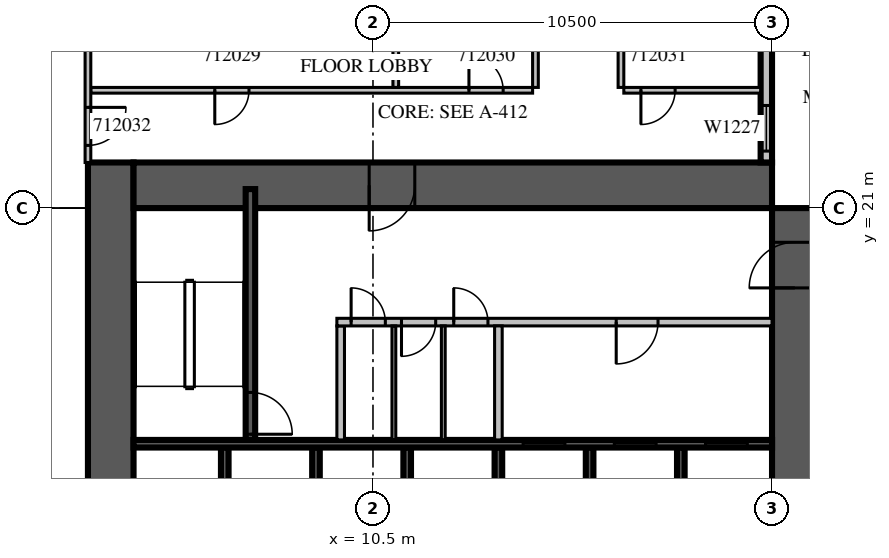
"""IFC4 building model, lengths in metres.
Left out: names, types, materials, properties, quantities, classifications, styles, units other than length and angle.
Written with IfcOpenShell. Run it as: python <this file> out.ifc"""

import sys

from ifc_helpers import new_model, si_unit, direction, frame, frame_2d, origin, place, context, subcontext, project, spatial, rectangle, extrude, source, transform, mapped, element, fill, save


model = new_model("IFC4")
c1 = context("Model", 3, precision=1e-05, world=origin(), true_north=direction((0.0, 1.0)))
c2 = subcontext(c1, "Body", "Model", "MODEL_VIEW")
j1 = project(units=[si_unit("LENGTHUNIT", "METRE"), si_unit("PLANEANGLEUNIT", "RADIAN")], contexts=[c1])
p1 = place(None, origin())
s1 = spatial("IfcSite", under=j1, at=p1, CompositionType="ELEMENT")
p2 = place(p1, origin())
s2 = spatial("IfcBuilding", under=s1, at=p2, CompositionType="ELEMENT")
p3 = place(p2, frame((0.0, 0.0, 61.5)))
s3 = spatial("IfcBuildingStorey", under=s2, at=p3, CompositionType="ELEMENT", Elevation=61.5)
m1 = source(origin(), c2, "Body", "SweptSolid", [
    extrude(rectangle(XDim=18.0, YDim=1.2, at=frame_2d((9.0, 0.0))), origin(), (0.0, 0.0, 1.0), 4.2),
])
p4 = place(p3, frame((3.6, 4.2, 0.0), z_axis=(0.0, 0.0, 1.0), x_axis=(0.0, 1.0, 0.0)))
e1 = element("IfcWall", 1, at=p4, inside=s3, PredefinedType="SHEAR", context=c2, shape_type="MappedRepresentation", body=[
    mapped(m1, transform((0.0, 0.0, 0.0), scale=1.0)),
])
m2 = source(origin(), c2, "Body", "SweptSolid", [
    extrude(rectangle(XDim=2.2, YDim=2.1, at=frame_2d((1.1, 1.05))), frame((0.0, 0.61, 0.0), z_axis=(0.0, -1.0, 0.0), x_axis=(1.0, 0.0, 0.0)), (0.0, 0.0, 1.0), 1.22),
])
p5 = place(p4, frame((4.2, 0.0, 0.0)))
e2 = element("IfcOpeningElement", 2, at=p5, cuts=e1, PredefinedType="OPENING", context=c2, shape_type="MappedRepresentation", body=[
    mapped(m2, transform((0.0, 0.0, 0.0), scale=1.0)),
])
m3 = source(origin(), c2, "Body", "SweptSolid", [
    extrude(rectangle(XDim=16.8, YDim=1.2, at=frame_2d((8.4, 0.0))), origin(), (0.0, 0.0, 1.0), 4.2),
])
p6 = place(p3, frame((21.6, 4.2, 0.0), z_axis=(0.0, 0.0, 1.0), x_axis=(0.0, 1.0, 0.0)))
e3 = element("IfcWall", 3, at=p6, inside=s3, PredefinedType="SHEAR", context=c2, shape_type="MappedRepresentation", body=[
    mapped(m3, transform((0.0, 0.0, 0.0), scale=1.0)),
])
p7 = place(p6, frame((4.2, 0.0, 0.0)))
e4 = element("IfcOpeningElement", 4, at=p7, cuts=e3, PredefinedType="OPENING", context=c2, shape_type="MappedRepresentation", body=[
    mapped(m2, transform((0.0, 0.0, 0.0), scale=1.0)),
])
m4 = source(origin(), c2, "Body", "SweptSolid", [
    extrude(rectangle(XDim=1.2, YDim=2.1, at=frame_2d((0.6, 1.05))), frame((0.0, 0.61, 0.0), z_axis=(0.0, -1.0, 0.0), x_axis=(1.0, 0.0, 0.0)), (0.0, 0.0, 1.0), 1.22),
])
p8 = place(p6, frame((14.7, 0.0, 0.0)))
e5 = element("IfcOpeningElement", 5, at=p8, cuts=e3, PredefinedType="OPENING", context=c2, shape_type="MappedRepresentation", body=[
    mapped(m4, transform((0.0, 0.0, 0.0), scale=1.0)),
])
p9 = place(p3, frame((4.2, 21.6, 0.0), z_axis=(0.0, 0.0, 1.0), x_axis=(1.0, 0.0, 0.0)))
e6 = element("IfcWall", 6, at=p9, inside=s3, PredefinedType="SHEAR", context=c2, shape_type="MappedRepresentation", body=[
    mapped(m3, transform((0.0, 0.0, 0.0), scale=1.0)),
])
p10 = place(p9, frame((6.2, 0.0, 0.0)))
e7 = element("IfcOpeningElement", 7, at=p10, cuts=e6, PredefinedType="OPENING", context=c2, shape_type="MappedRepresentation", body=[
    mapped(m4, transform((0.0, 0.0, 0.0), scale=1.0)),
])
m5 = source(origin(), c2, "Body", "SweptSolid", [
    extrude(rectangle(XDim=6.6, YDim=0.3, at=frame_2d((3.3, 0.0))), origin(), (0.0, 0.0, 1.0), 3.8),
])
p11 = place(p3, frame((20.85, 22.2, 0.0), z_axis=(0.0, 0.0, 1.0), x_axis=(0.0, 1.0, 0.0)))
e8 = element("IfcWall", 8, at=p11, inside=s3, PredefinedType="STANDARD", context=c2, shape_type="MappedRepresentation", body=[
    mapped(m5, transform((0.0, 0.0, 0.0), scale=1.0)),
])
m6 = source(origin(), c2, "Body", "SweptSolid", [
    extrude(rectangle(XDim=1.2, YDim=2.7, at=frame_2d((0.6, 1.35))), frame((0.0, 0.16, 0.0), z_axis=(0.0, -1.0, 0.0), x_axis=(1.0, 0.0, 0.0)), (0.0, 0.0, 1.0), 0.32),
])
p12 = place(p11, frame((0.3, 0.0, 0.6)))
e9 = element("IfcOpeningElement", 9, at=p12, cuts=e8, PredefinedType="OPENING", context=c2, shape_type="MappedRepresentation", body=[
    mapped(m6, transform((0.0, 0.0, 0.0), scale=1.0)),
])
m7 = source(origin(), c2, "Body", "SweptSolid", [
    extrude(rectangle(XDim=1.0, YDim=2.1, at=frame_2d((0.5, 1.05))), frame((0.0, 0.16, 0.0), z_axis=(0.0, -1.0, 0.0), x_axis=(1.0, 0.0, 0.0)), (0.0, 0.0, 1.0), 0.32),
])
p13 = place(p11, frame((4.6, 0.0, 0.0)))
e10 = element("IfcOpeningElement", 10, at=p13, cuts=e8, PredefinedType="OPENING", context=c2, shape_type="MappedRepresentation", body=[
    mapped(m7, transform((0.0, 0.0, 0.0), scale=1.0)),
])
m8 = source(origin(), c2, "Body", "SweptSolid", [
    extrude(rectangle(XDim=3.0, YDim=0.2, at=frame_2d((1.5, 0.0))), origin(), (0.0, 0.0, 1.0), 4.2),
])
for number, where, z_axis, x_axis in (
    (11, (6.6, 11.7, 0.0), (0.0, 0.0, 1.0), (0.0, 1.0, 0.0)),
    (12, (9.0, 11.7, 0.0), (0.0, 0.0, 1.0), (0.0, 1.0, 0.0)),
    (13, (11.4, 11.7, 0.0), (0.0, 0.0, 1.0), (0.0, 1.0, 0.0)),
    (14, (13.8, 11.7, 0.0), (0.0, 0.0, 1.0), (0.0, 1.0, 0.0)),
    (15, (16.2, 11.7, 0.0), (0.0, 0.0, 1.0), (0.0, 1.0, 0.0)),
    (16, (18.6, 11.7, 0.0), (0.0, 0.0, 1.0), (0.0, 1.0, 0.0)),
):
    element("IfcWall", number, at=place(p3, frame(where, z_axis=z_axis, x_axis=x_axis)), inside=s3, PredefinedType="SOLIDWALL", context=c2, shape_type="MappedRepresentation", body=[
        mapped(m8, transform((0.0, 0.0, 0.0), scale=1.0)),
    ])
m9 = source(origin(), c2, "Body", "SweptSolid", [
    extrude(rectangle(XDim=16.8, YDim=0.2, at=frame_2d((8.4, 0.0))), origin(), (0.0, 0.0, 1.0), 4.2),
])
p14 = place(p3, frame((4.2, 14.8, 0.0), z_axis=(0.0, 0.0, 1.0), x_axis=(1.0, 0.0, 0.0)))
e17 = element("IfcWall", 17, at=p14, inside=s3, PredefinedType="SOLIDWALL", context=c2, shape_type="MappedRepresentation", body=[
    mapped(m9, transform((0.0, 0.0, 0.0), scale=1.0)),
])
m10 = source(origin(), c2, "Body", "SweptSolid", [
    extrude(rectangle(XDim=1.1, YDim=2.1, at=frame_2d((0.55, 1.05))), frame((0.0, 0.11, 0.0), z_axis=(0.0, -1.0, 0.0), x_axis=(1.0, 0.0, 0.0)), (0.0, 0.0, 1.0), 0.22),
])
p15 = place(p14, frame((10.25, 0.0, 0.0)))
e18 = element("IfcOpeningElement", 18, at=p15, cuts=e17, PredefinedType="OPENING", context=c2, shape_type="MappedRepresentation", body=[
    mapped(m10, transform((0.0, 0.0, 0.0), scale=1.0)),
])
p16 = place(p14, frame((12.65, 0.0, 0.0)))
e19 = element("IfcOpeningElement", 19, at=p16, cuts=e17, PredefinedType="OPENING", context=c2, shape_type="MappedRepresentation", body=[
    mapped(m10, transform((0.0, 0.0, 0.0), scale=1.0)),
])
p17 = place(p14, frame((15.05, 0.0, 0.0)))
e20 = element("IfcOpeningElement", 20, at=p17, cuts=e17, PredefinedType="OPENING", context=c2, shape_type="MappedRepresentation", body=[
    mapped(m10, transform((0.0, 0.0, 0.0), scale=1.0)),
])
m11 = source(origin(), c2, "Body", "SweptSolid", [
    extrude(rectangle(XDim=6.6, YDim=0.25, at=frame_2d((3.3, 0.0))), origin(), (0.0, 0.0, 1.0), 3.8),
])
p18 = place(p3, frame((7.275, 14.9, 0.0), z_axis=(0.0, 0.0, 1.0), x_axis=(0.0, 1.0, 0.0)))
e21 = element("IfcWall", 21, at=p18, inside=s3, PredefinedType="SOLIDWALL", context=c2, shape_type="MappedRepresentation", body=[
    mapped(m11, transform((0.0, 0.0, 0.0), scale=1.0)),
])
m12 = source(origin(), c2, "Body", "SweptSolid", [
    extrude(rectangle(XDim=1.1, YDim=2.1, at=frame_2d((0.55, 1.05))), frame((0.0, 0.135, 0.0), z_axis=(0.0, -1.0, 0.0), x_axis=(1.0, 0.0, 0.0)), (0.0, 0.0, 1.0), 0.27),
])
p19 = place(p18, frame((0.15, 0.0, 0.0)))
e22 = element("IfcOpeningElement", 22, at=p19, cuts=e21, PredefinedType="OPENING", context=c2, shape_type="MappedRepresentation", body=[
    mapped(m12, transform((0.0, 0.0, 0.0), scale=1.0)),
])
m13 = source(origin(), c2, "Body", "SweptSolid", [
    extrude(rectangle(XDim=3.0, YDim=0.2, at=frame_2d((1.5, 0.0))), origin(), (0.0, 0.0, 1.0), 3.8),
])
p20 = place(p3, frame((9.65, 14.9, 0.0), z_axis=(0.0, 0.0, 1.0), x_axis=(0.0, 1.0, 0.0)))
e23 = element("IfcWall", 23, at=p20, inside=s3, PredefinedType="PARTITIONING", context=c2, shape_type="MappedRepresentation", body=[
    mapped(m13, transform((0.0, 0.0, 0.0), scale=1.0)),
])
m14 = source(origin(), c2, "Body", "SweptSolid", [
    extrude(rectangle(XDim=11.45, YDim=0.2, at=frame_2d((5.725, 0.0))), origin(), (0.0, 0.0, 1.0), 3.8),
])
p21 = place(p3, frame((9.55, 18.0, 0.0), z_axis=(0.0, 0.0, 1.0), x_axis=(1.0, 0.0, 0.0)))
e24 = element("IfcWall", 24, at=p21, inside=s3, PredefinedType="PARTITIONING", context=c2, shape_type="MappedRepresentation", body=[
    mapped(m14, transform((0.0, 0.0, 0.0), scale=1.0)),
])
m15 = source(origin(), c2, "Body", "SweptSolid", [
    extrude(rectangle(XDim=0.9, YDim=2.1, at=frame_2d((0.45, 1.05))), frame((0.0, 0.11, 0.0), z_axis=(0.0, -1.0, 0.0), x_axis=(1.0, 0.0, 0.0)), (0.0, 0.0, 1.0), 0.22),
])
p22 = place(p21, frame((0.375, 0.0, 0.0)))
e25 = element("IfcOpeningElement", 25, at=p22, cuts=e24, PredefinedType="OPENING", context=c2, shape_type="MappedRepresentation", body=[
    mapped(m15, transform((0.0, 0.0, 0.0), scale=1.0)),
])
p23 = place(p21, frame((1.7, 0.0, 0.0)))
e26 = element("IfcOpeningElement", 26, at=p23, cuts=e24, PredefinedType="OPENING", context=c2, shape_type="MappedRepresentation", body=[
    mapped(m15, transform((0.0, 0.0, 0.0), scale=1.0)),
])
p24 = place(p21, frame((3.075, 0.0, 0.0)))
e27 = element("IfcOpeningElement", 27, at=p24, cuts=e24, PredefinedType="OPENING", context=c2, shape_type="MappedRepresentation", body=[
    mapped(m15, transform((0.0, 0.0, 0.0), scale=1.0)),
])
p25 = place(p21, frame((7.35, 0.0, 0.0)))
e28 = element("IfcOpeningElement", 28, at=p25, cuts=e24, PredefinedType="OPENING", context=c2, shape_type="MappedRepresentation", body=[
    mapped(m10, transform((0.0, 0.0, 0.0), scale=1.0)),
])
p26 = place(p3, frame((13.8, 14.9, 0.0), z_axis=(0.0, 0.0, 1.0), x_axis=(0.0, 1.0, 0.0)))
e29 = element("IfcWall", 29, at=p26, inside=s3, PredefinedType="PARTITIONING", context=c2, shape_type="MappedRepresentation", body=[
    mapped(m13, transform((0.0, 0.0, 0.0), scale=1.0)),
])
m16 = source(origin(), c2, "Body", "SweptSolid", [
    extrude(rectangle(XDim=3.0, YDim=0.1, at=frame_2d((1.5, 0.0))), origin(), (0.0, 0.0, 1.0), 3.8),
])
for number, where, z_axis, x_axis in (
    (30, (11.05, 14.9, 0.0), (0.0, 0.0, 1.0), (0.0, 1.0, 0.0)),
    (31, (12.35, 14.9, 0.0), (0.0, 0.0, 1.0), (0.0, 1.0, 0.0)),
):
    element("IfcWall", number, at=place(p3, frame(where, z_axis=z_axis, x_axis=x_axis)), inside=s3, PredefinedType="PARTITIONING", context=c2, shape_type="MappedRepresentation", body=[
        mapped(m16, transform((0.0, 0.0, 0.0), scale=1.0)),
    ])
p27 = place(p3, frame((3.075, 24.1, 0.0), z_axis=(0.0, 0.0, 1.0), x_axis=(1.0, 0.0, 0.0)))
e32 = element("IfcWall", 32, at=p27, inside=s3, PredefinedType="PARTITIONING", context=c2, shape_type="SweptSolid", body=[
    extrude(rectangle(XDim=11.625, YDim=0.15, at=frame_2d((5.812, 0.0))), origin(), (0.0, 0.0, 1.0), 3.8),
])
m17 = source(origin(), c2, "Body", "SweptSolid", [
    extrude(rectangle(XDim=0.9, YDim=2.1, at=frame_2d((0.45, 1.05))), frame((0.0, 0.085, 0.0), z_axis=(0.0, -1.0, 0.0), x_axis=(1.0, 0.0, 0.0)), (0.0, 0.0, 1.0), 0.17),
])
p28 = place(p27, frame((3.263, 0.0, 0.0)))
e33 = element("IfcOpeningElement", 33, at=p28, cuts=e32, PredefinedType="OPENING", context=c2, shape_type="MappedRepresentation", body=[
    mapped(m17, transform((0.0, 0.0, 0.0), scale=1.0)),
])
p29 = place(p27, frame((9.95, 0.0, 0.0)))
e34 = element("IfcOpeningElement", 34, at=p29, cuts=e32, PredefinedType="OPENING", context=c2, shape_type="MappedRepresentation", body=[
    mapped(m17, transform((0.0, 0.0, 0.0), scale=1.0)),
])
m18 = source(origin(), c2, "Body", "SweptSolid", [
    extrude(rectangle(XDim=3.6, YDim=0.15, at=frame_2d((1.8, 0.0))), origin(), (0.0, 0.0, 1.0), 3.8),
])
p30 = place(p3, frame((17.1, 24.1, 0.0), z_axis=(0.0, 0.0, 1.0), x_axis=(1.0, 0.0, 0.0)))
e35 = element("IfcWall", 35, at=p30, inside=s3, PredefinedType="PARTITIONING", context=c2, shape_type="MappedRepresentation", body=[
    mapped(m18, transform((0.0, 0.0, 0.0), scale=1.0)),
])
p31 = place(p30, frame((0.45, 0.0, 0.0)))
e36 = element("IfcOpeningElement", 36, at=p31, cuts=e35, PredefinedType="OPENING", context=c2, shape_type="MappedRepresentation", body=[
    mapped(m17, transform((0.0, 0.0, 0.0), scale=1.0)),
])
m19 = source(origin(), c2, "Body", "SweptSolid", [
    extrude(rectangle(XDim=5.15, YDim=0.15, at=frame_2d((2.575, 0.0))), origin(), (0.0, 0.0, 1.0), 3.8),
])
for number, where, z_axis, x_axis in (
    (37, (11.1, 24.175, 0.0), (0.0, 0.0, 1.0), (0.0, 1.0, 0.0)),
    (38, (14.775, 24.175, 0.0), (0.0, 0.0, 1.0), (0.0, 1.0, 0.0)),
    (39, (17.025, 29.325, 0.0), (0.0, 0.0, 1.0), (0.0, -1.0, 0.0)),
):
    element("IfcWall", number, at=place(p3, frame(where, z_axis=z_axis, x_axis=x_axis)), inside=s3, PredefinedType="PARTITIONING", context=c2, shape_type="MappedRepresentation", body=[
        mapped(m19, transform((0.0, 0.0, 0.0), scale=1.0)),
    ])
m20 = source(origin(), c2, "Body", "SweptSolid", [
    extrude(rectangle(XDim=7.125, YDim=0.15, at=frame_2d((3.562, 0.0))), origin(), (0.0, 0.0, 1.0), 3.8),
])
p32 = place(p3, frame((3.0, 29.325, 0.0), z_axis=(0.0, 0.0, 1.0), x_axis=(0.0, -1.0, 0.0)))
e40 = element("IfcWall", 40, at=p32, inside=s3, PredefinedType="PARTITIONING", context=c2, shape_type="MappedRepresentation", body=[
    mapped(m20, transform((0.0, 0.0, 0.0), scale=1.0)),
])
m21 = source(origin(), c2, "Body", "SweptSolid", [
    extrude(rectangle(XDim=1.0, YDim=2.1, at=frame_2d((0.5, 1.05))), frame((0.0, 0.085, 0.0), z_axis=(0.0, -1.0, 0.0), x_axis=(1.0, 0.0, 0.0)), (0.0, 0.0, 1.0), 0.17),
])
p33 = place(p32, frame((5.675, 0.0, 0.0)))
e41 = element("IfcOpeningElement", 41, at=p33, cuts=e40, PredefinedType="OPENING", context=c2, shape_type="MappedRepresentation", body=[
    mapped(m21, transform((0.0, 0.0, 0.0), scale=1.0)),
])
m22 = source(origin(), c2, "Body", "SweptSolid", [
    extrude(rectangle(XDim=1.2, YDim=2.7, at=frame_2d((0.6, 1.35))), frame((0.0, 0.03, 0.0), z_axis=(0.0, -1.0, 0.0), x_axis=(1.0, 0.0, 0.0)), (0.0, 0.0, 1.0), 0.06),
])
p34 = place(p12, origin())
e42 = element("IfcWindow", 42, at=p34, inside=s3, PartitioningType="SINGLE_PANEL", PredefinedType="WINDOW", context=c2, shape_type="MappedRepresentation", body=[
    mapped(m22, transform((0.0, 0.0, 0.0), scale=1.0)),
])
fill(e9, e42)
m23 = source(origin(), c2, "Body", "SweptSolid", [
    extrude(rectangle(XDim=1.1, YDim=2.1, at=frame_2d((0.55, 1.05))), frame((0.0, 0.025, 0.0), z_axis=(0.0, -1.0, 0.0), x_axis=(1.0, 0.0, 0.0)), (0.0, 0.0, 1.0), 0.05),
])
p35 = place(p15, origin())
e43 = element("IfcDoor", 43, at=p35, inside=s3, OperationType="SLIDING_TO_LEFT", PredefinedType="DOOR", context=c2, shape_type="MappedRepresentation", body=[
    mapped(m23, transform((0.0, 0.0, 0.0), scale=1.0)),
])
fill(e18, e43)
p36 = place(p16, origin())
e44 = element("IfcDoor", 44, at=p36, inside=s3, OperationType="SLIDING_TO_LEFT", PredefinedType="DOOR", context=c2, shape_type="MappedRepresentation", body=[
    mapped(m23, transform((0.0, 0.0, 0.0), scale=1.0)),
])
fill(e19, e44)
p37 = place(p17, origin())
e45 = element("IfcDoor", 45, at=p37, inside=s3, OperationType="SLIDING_TO_LEFT", PredefinedType="DOOR", context=c2, shape_type="MappedRepresentation", body=[
    mapped(m23, transform((0.0, 0.0, 0.0), scale=1.0)),
])
fill(e20, e45)
p38 = place(p19, origin())
e46 = element("IfcDoor", 46, at=p38, inside=s3, OperationType="SINGLE_SWING_RIGHT", PredefinedType="DOOR", context=c2, shape_type="MappedRepresentation", body=[
    mapped(m23, transform((0.0, 0.0, 0.0), scale=1.0)),
])
fill(e22, e46)
m24 = source(origin(), c2, "Body", "SweptSolid", [
    extrude(rectangle(XDim=0.9, YDim=2.1, at=frame_2d((0.45, 1.05))), frame((0.0, 0.025, 0.0), z_axis=(0.0, -1.0, 0.0), x_axis=(1.0, 0.0, 0.0)), (0.0, 0.0, 1.0), 0.05),
])
p39 = place(p22, origin())
e47 = element("IfcDoor", 47, at=p39, inside=s3, OperationType="SINGLE_SWING_LEFT", PredefinedType="DOOR", context=c2, shape_type="MappedRepresentation", body=[
    mapped(m24, transform((0.0, 0.0, 0.0), scale=1.0)),
])
fill(e25, e47)
p40 = place(p23, origin())
e48 = element("IfcDoor", 48, at=p40, inside=s3, OperationType="SINGLE_SWING_RIGHT", PredefinedType="DOOR", context=c2, shape_type="MappedRepresentation", body=[
    mapped(m24, transform((0.0, 0.0, 0.0), scale=1.0)),
])
fill(e26, e48)
p41 = place(p24, origin())
e49 = element("IfcDoor", 49, at=p41, inside=s3, OperationType="SINGLE_SWING_LEFT", PredefinedType="DOOR", context=c2, shape_type="MappedRepresentation", body=[
    mapped(m24, transform((0.0, 0.0, 0.0), scale=1.0)),
])
fill(e27, e49)
p42 = place(p25, origin())
e50 = element("IfcDoor", 50, at=p42, inside=s3, OperationType="SINGLE_SWING_RIGHT", PredefinedType="DOOR", context=c2, shape_type="MappedRepresentation", body=[
    mapped(m23, transform((0.0, 0.0, 0.0), scale=1.0)),
])
fill(e28, e50)
m25 = source(origin(), c2, "Body", "SweptSolid", [
    extrude(rectangle(XDim=1.2, YDim=2.1, at=frame_2d((0.6, 1.05))), frame((0.0, 0.025, 0.0), z_axis=(0.0, -1.0, 0.0), x_axis=(1.0, 0.0, 0.0)), (0.0, 0.0, 1.0), 0.05),
])
p43 = place(p10, origin())
e51 = element("IfcDoor", 51, at=p43, inside=s3, OperationType="SINGLE_SWING_RIGHT", PredefinedType="DOOR", context=c2, shape_type="MappedRepresentation", body=[
    mapped(m25, transform((0.0, 0.0, 0.0), scale=1.0)),
])
fill(e7, e51)
p44 = place(p8, origin())
e52 = element("IfcDoor", 52, at=p44, inside=s3, OperationType="SINGLE_SWING_LEFT", PredefinedType="DOOR", context=c2, shape_type="MappedRepresentation", body=[
    mapped(m25, transform((0.0, 0.0, 0.0), scale=1.0)),
])
fill(e5, e52)
p45 = place(p28, origin())
e53 = element("IfcDoor", 53, at=p45, inside=s3, OperationType="SINGLE_SWING_RIGHT", PredefinedType="DOOR", context=c2, shape_type="MappedRepresentation", body=[
    mapped(m24, transform((0.0, 0.0, 0.0), scale=1.0)),
])
fill(e33, e53)
p46 = place(p29, origin())
e54 = element("IfcDoor", 54, at=p46, inside=s3, OperationType="SINGLE_SWING_LEFT", PredefinedType="DOOR", context=c2, shape_type="MappedRepresentation", body=[
    mapped(m24, transform((0.0, 0.0, 0.0), scale=1.0)),
])
fill(e34, e54)
p47 = place(p31, origin())
e55 = element("IfcDoor", 55, at=p47, inside=s3, OperationType="SINGLE_SWING_RIGHT", PredefinedType="DOOR", context=c2, shape_type="MappedRepresentation", body=[
    mapped(m24, transform((0.0, 0.0, 0.0), scale=1.0)),
])
fill(e36, e55)
m26 = source(origin(), c2, "Body", "SweptSolid", [
    extrude(rectangle(XDim=1.0, YDim=2.1, at=frame_2d((0.5, 1.05))), frame((0.0, 0.025, 0.0), z_axis=(0.0, -1.0, 0.0), x_axis=(1.0, 0.0, 0.0)), (0.0, 0.0, 1.0), 0.05),
])
p48 = place(p33, origin())
e56 = element("IfcDoor", 56, at=p48, inside=s3, OperationType="SINGLE_SWING_LEFT", PredefinedType="DOOR", context=c2, shape_type="MappedRepresentation", body=[
    mapped(m26, transform((0.0, 0.0, 0.0), scale=1.0)),
])
fill(e41, e56)
save(model, sys.argv[1])
